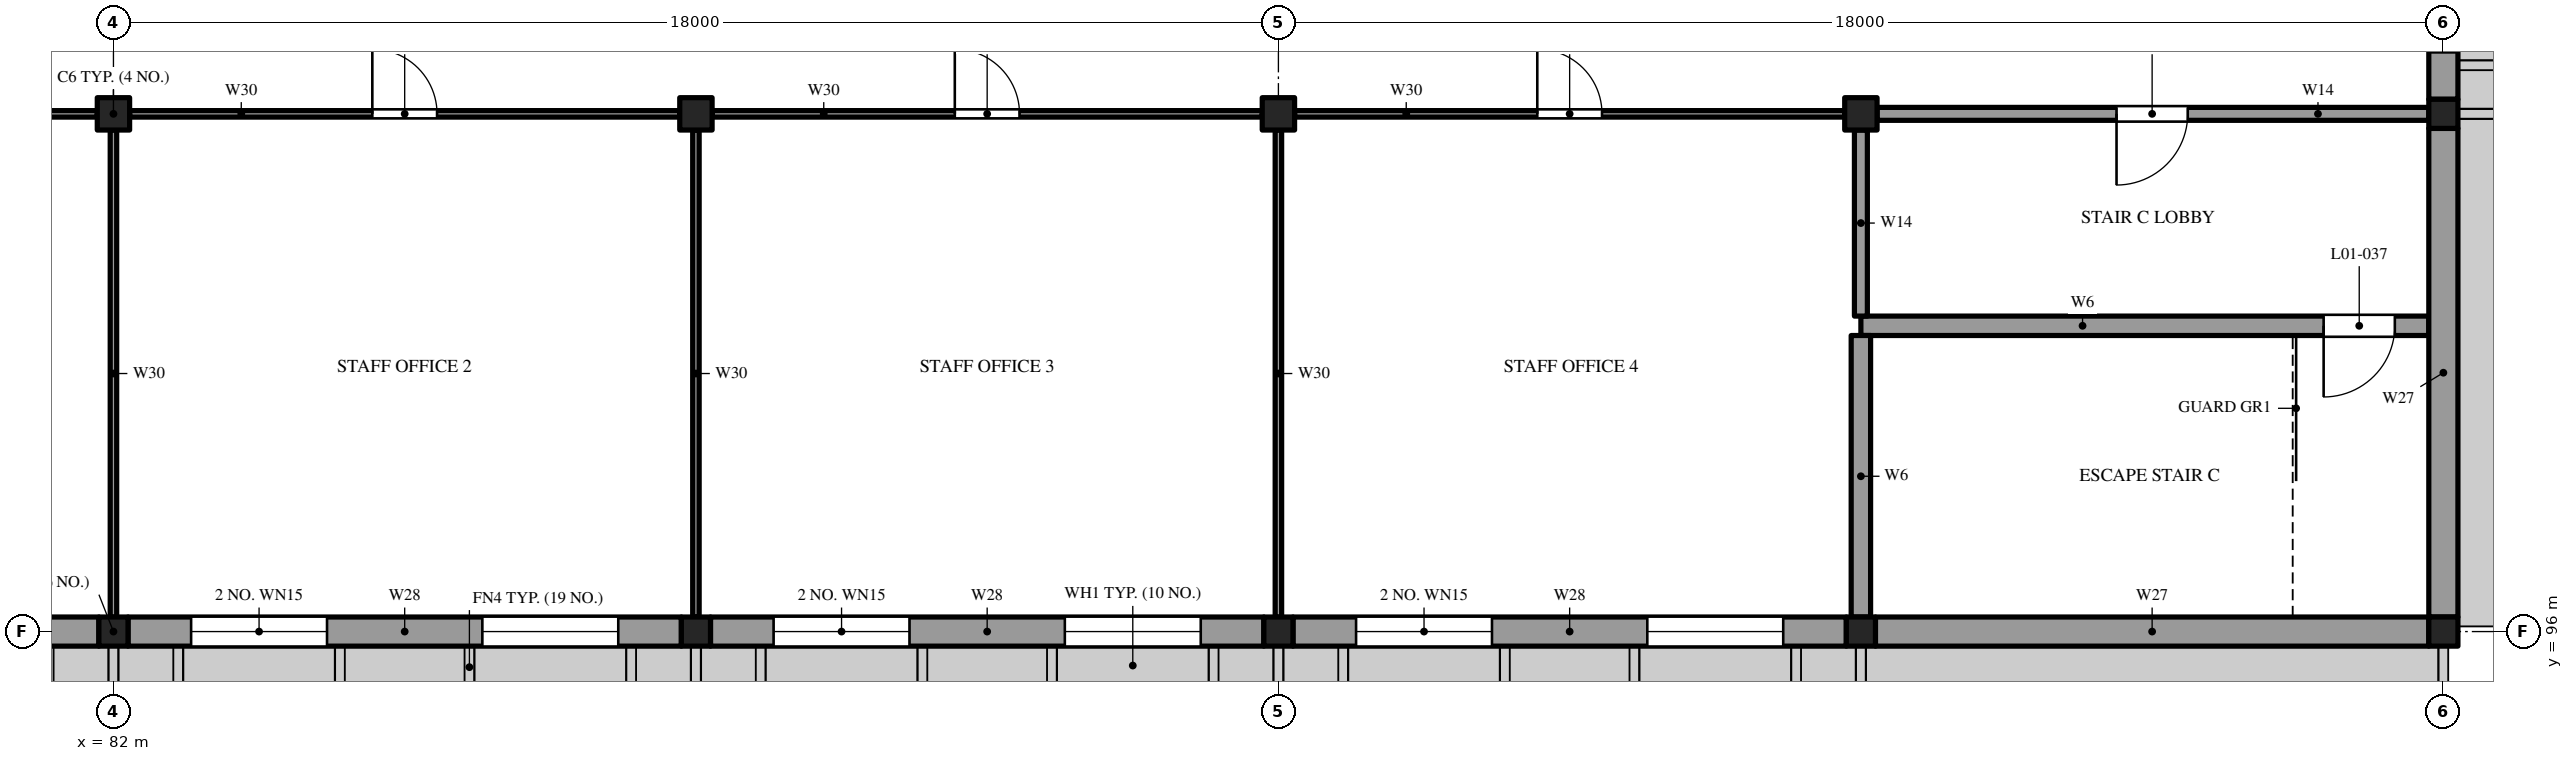
"""IFC4 building model, lengths in metres.
Left out: names, types, materials, properties, quantities, classifications, styles, units other than length and angle.
Written with IfcOpenShell. Run it as: python <this file> out.ifc"""

import sys

from ifc_helpers import new_model, si_unit, direction, frame, frame_2d, origin, origin_2d, place, context, subcontext, project, spatial, rectangle, extrude, element, fill, save


model = new_model("IFC4")
c1 = context("Model", 3, precision=1e-05, world=origin(), true_north=direction((0.0, 1.0)))
c2 = subcontext(c1, "Body", "Model", "MODEL_VIEW")
j1 = project(units=[si_unit("LENGTHUNIT", "METRE"), si_unit("PLANEANGLEUNIT", "RADIAN")], contexts=[c1])
p1 = place(None, origin())
s1 = spatial("IfcSite", under=j1, at=p1, CompositionType="ELEMENT")
p2 = place(p1, origin())
s2 = spatial("IfcBuilding", under=s1, at=p2, CompositionType="ELEMENT")
p3 = place(p2, frame((0.0, 0.0, 7.2)))
s3 = spatial("IfcBuildingStorey", under=s2, at=p3, CompositionType="ELEMENT", Elevation=7.2)
p4 = place(p3, frame((82.0, 96.0, 0.0), z_axis=(0.0, 0.0, 1.0), x_axis=(1.0, 0.0, 0.0)))
e1 = element("IfcColumn", 1, at=p4, inside=s3, PredefinedType="COLUMN", context=c2, shape_type="SweptSolid", body=[
    extrude(rectangle(XDim=0.45, YDim=0.45, at=origin_2d()), origin(), (0.0, 0.0, 1.0), 4.8),
])
p5 = place(p3, frame((82.0, 104.0, 0.0), z_axis=(0.0, 0.0, 1.0), x_axis=(1.0, 0.0, 0.0)))
e2 = element("IfcColumn", 2, at=p5, inside=s3, PredefinedType="COLUMN", context=c2, shape_type="SweptSolid", body=[
    extrude(rectangle(XDim=0.5, YDim=0.5, at=origin_2d()), origin(), (0.0, 0.0, 1.0), 4.8),
])
p6 = place(p3, frame((91.0, 96.0, 0.0), z_axis=(0.0, 0.0, 1.0), x_axis=(1.0, 0.0, 0.0)))
e3 = element("IfcColumn", 3, at=p6, inside=s3, PredefinedType="COLUMN", context=c2, shape_type="SweptSolid", body=[
    extrude(rectangle(XDim=0.45, YDim=0.45, at=origin_2d()), origin(), (0.0, 0.0, 1.0), 4.8),
])
p7 = place(p3, frame((91.0, 104.0, 0.0), z_axis=(0.0, 0.0, 1.0), x_axis=(1.0, 0.0, 0.0)))
e4 = element("IfcColumn", 4, at=p7, inside=s3, PredefinedType="COLUMN", context=c2, shape_type="SweptSolid", body=[
    extrude(rectangle(XDim=0.5, YDim=0.5, at=origin_2d()), origin(), (0.0, 0.0, 1.0), 4.8),
])
p8 = place(p3, frame((100.0, 96.0, 0.0), z_axis=(0.0, 0.0, 1.0), x_axis=(1.0, 0.0, 0.0)))
e5 = element("IfcColumn", 5, at=p8, inside=s3, PredefinedType="COLUMN", context=c2, shape_type="SweptSolid", body=[
    extrude(rectangle(XDim=0.45, YDim=0.45, at=origin_2d()), origin(), (0.0, 0.0, 1.0), 4.8),
])
p9 = place(p3, frame((100.0, 104.0, 0.0), z_axis=(0.0, 0.0, 1.0), x_axis=(1.0, 0.0, 0.0)))
e6 = element("IfcColumn", 6, at=p9, inside=s3, PredefinedType="COLUMN", context=c2, shape_type="SweptSolid", body=[
    extrude(rectangle(XDim=0.5, YDim=0.5, at=origin_2d()), origin(), (0.0, 0.0, 1.0), 4.8),
])
p10 = place(p3, frame((109.0, 96.0, 0.0), z_axis=(0.0, 0.0, 1.0), x_axis=(1.0, 0.0, 0.0)))
e7 = element("IfcColumn", 7, at=p10, inside=s3, PredefinedType="COLUMN", context=c2, shape_type="SweptSolid", body=[
    extrude(rectangle(XDim=0.45, YDim=0.45, at=origin_2d()), origin(), (0.0, 0.0, 1.0), 4.8),
])
p11 = place(p3, frame((109.0, 104.0, 0.0), z_axis=(0.0, 0.0, 1.0), x_axis=(1.0, 0.0, 0.0)))
e8 = element("IfcColumn", 8, at=p11, inside=s3, PredefinedType="COLUMN", context=c2, shape_type="SweptSolid", body=[
    extrude(rectangle(XDim=0.5, YDim=0.5, at=origin_2d()), origin(), (0.0, 0.0, 1.0), 4.8),
])
for number, where, z_axis, x_axis in (
    (9, (118.0, 96.0, 0.0), (0.0, 0.0, 1.0), (1.0, 0.0, 0.0)),
    (10, (118.0, 104.0, 0.0), (0.0, 0.0, 1.0), (1.0, 0.0, 0.0)),
):
    element("IfcColumn", number, at=place(p3, frame(where, z_axis=z_axis, x_axis=x_axis)), inside=s3, PredefinedType="COLUMN", context=c2, shape_type="SweptSolid", body=[
        extrude(rectangle(XDim=0.45, YDim=0.45, at=origin_2d()), origin(), (0.0, 0.0, 1.0), 4.8),
    ])
p12 = place(p3, frame((73.225, 96.0, 0.0), z_axis=(0.0, 0.0, 1.0), x_axis=(1.0, 0.0, 0.0)))
e11 = element("IfcWall", 11, at=p12, inside=s3, PredefinedType="SOLIDWALL", context=c2, shape_type="SweptSolid", body=[
    extrude(rectangle(XDim=8.55, YDim=0.45, at=frame_2d((4.275, 0.0))), origin(), (0.0, 0.0, 1.0), 4.5),
])
p13 = place(p12, frame((0.975, 0.0, 0.9)))
e12 = element("IfcOpeningElement", 12, at=p13, cuts=e11, PredefinedType="OPENING", context=c2, shape_type="SweptSolid", body=[
    extrude(rectangle(XDim=2.1, YDim=2.2, at=frame_2d((1.05, 1.1))), frame((0.0, 0.235, 0.0), z_axis=(0.0, -1.0, 0.0), x_axis=(1.0, 0.0, 0.0)), (0.0, 0.0, 1.0), 0.47),
])
p14 = place(p12, frame((5.475, 0.0, 0.9)))
e13 = element("IfcOpeningElement", 13, at=p14, cuts=e11, PredefinedType="OPENING", context=c2, shape_type="SweptSolid", body=[
    extrude(rectangle(XDim=2.1, YDim=2.2, at=frame_2d((1.05, 1.1))), frame((0.0, 0.235, 0.0), z_axis=(0.0, -1.0, 0.0), x_axis=(1.0, 0.0, 0.0)), (0.0, 0.0, 1.0), 0.47),
])
p15 = place(p3, frame((82.225, 96.0, 0.0), z_axis=(0.0, 0.0, 1.0), x_axis=(1.0, 0.0, 0.0)))
e14 = element("IfcWall", 14, at=p15, inside=s3, PredefinedType="SOLIDWALL", context=c2, shape_type="SweptSolid", body=[
    extrude(rectangle(XDim=8.55, YDim=0.45, at=frame_2d((4.275, 0.0))), origin(), (0.0, 0.0, 1.0), 4.5),
])
p16 = place(p15, frame((0.975, 0.0, 0.9)))
e15 = element("IfcOpeningElement", 15, at=p16, cuts=e14, PredefinedType="OPENING", context=c2, shape_type="SweptSolid", body=[
    extrude(rectangle(XDim=2.1, YDim=2.2, at=frame_2d((1.05, 1.1))), frame((0.0, 0.235, 0.0), z_axis=(0.0, -1.0, 0.0), x_axis=(1.0, 0.0, 0.0)), (0.0, 0.0, 1.0), 0.47),
])
p17 = place(p15, frame((5.475, 0.0, 0.9)))
e16 = element("IfcOpeningElement", 16, at=p17, cuts=e14, PredefinedType="OPENING", context=c2, shape_type="SweptSolid", body=[
    extrude(rectangle(XDim=2.1, YDim=2.2, at=frame_2d((1.05, 1.1))), frame((0.0, 0.235, 0.0), z_axis=(0.0, -1.0, 0.0), x_axis=(1.0, 0.0, 0.0)), (0.0, 0.0, 1.0), 0.47),
])
p18 = place(p3, frame((91.225, 96.0, 0.0), z_axis=(0.0, 0.0, 1.0), x_axis=(1.0, 0.0, 0.0)))
e17 = element("IfcWall", 17, at=p18, inside=s3, PredefinedType="SOLIDWALL", context=c2, shape_type="SweptSolid", body=[
    extrude(rectangle(XDim=8.55, YDim=0.45, at=frame_2d((4.275, 0.0))), origin(), (0.0, 0.0, 1.0), 4.5),
])
p19 = place(p18, frame((0.975, 0.0, 0.9)))
e18 = element("IfcOpeningElement", 18, at=p19, cuts=e17, PredefinedType="OPENING", context=c2, shape_type="SweptSolid", body=[
    extrude(rectangle(XDim=2.1, YDim=2.2, at=frame_2d((1.05, 1.1))), frame((0.0, 0.235, 0.0), z_axis=(0.0, -1.0, 0.0), x_axis=(1.0, 0.0, 0.0)), (0.0, 0.0, 1.0), 0.47),
])
p20 = place(p18, frame((5.475, 0.0, 0.9)))
e19 = element("IfcOpeningElement", 19, at=p20, cuts=e17, PredefinedType="OPENING", context=c2, shape_type="SweptSolid", body=[
    extrude(rectangle(XDim=2.1, YDim=2.2, at=frame_2d((1.05, 1.1))), frame((0.0, 0.235, 0.0), z_axis=(0.0, -1.0, 0.0), x_axis=(1.0, 0.0, 0.0)), (0.0, 0.0, 1.0), 0.47),
])
p21 = place(p3, frame((100.225, 96.0, 0.0), z_axis=(0.0, 0.0, 1.0), x_axis=(1.0, 0.0, 0.0)))
e20 = element("IfcWall", 20, at=p21, inside=s3, PredefinedType="SOLIDWALL", context=c2, shape_type="SweptSolid", body=[
    extrude(rectangle(XDim=8.55, YDim=0.45, at=frame_2d((4.275, 0.0))), origin(), (0.0, 0.0, 1.0), 4.5),
])
p22 = place(p21, frame((0.975, 0.0, 0.9)))
e21 = element("IfcOpeningElement", 21, at=p22, cuts=e20, PredefinedType="OPENING", context=c2, shape_type="SweptSolid", body=[
    extrude(rectangle(XDim=2.1, YDim=2.2, at=frame_2d((1.05, 1.1))), frame((0.0, 0.235, 0.0), z_axis=(0.0, -1.0, 0.0), x_axis=(1.0, 0.0, 0.0)), (0.0, 0.0, 1.0), 0.47),
])
p23 = place(p21, frame((5.475, 0.0, 0.9)))
e22 = element("IfcOpeningElement", 22, at=p23, cuts=e20, PredefinedType="OPENING", context=c2, shape_type="SweptSolid", body=[
    extrude(rectangle(XDim=2.1, YDim=2.2, at=frame_2d((1.05, 1.1))), frame((0.0, 0.235, 0.0), z_axis=(0.0, -1.0, 0.0), x_axis=(1.0, 0.0, 0.0)), (0.0, 0.0, 1.0), 0.47),
])
p24 = place(p3, frame((109.225, 96.0, 0.0), z_axis=(0.0, 0.0, 1.0), x_axis=(1.0, 0.0, 0.0)))
e23 = element("IfcWall", 23, at=p24, inside=s3, PredefinedType="SOLIDWALL", context=c2, shape_type="SweptSolid", body=[
    extrude(rectangle(XDim=8.55, YDim=0.45, at=frame_2d((4.275, 0.0))), origin(), (0.0, 0.0, 1.0), 4.5),
])
p25 = place(p3, frame((109.0, 100.725, 0.0), z_axis=(0.0, 0.0, 1.0), x_axis=(1.0, 0.0, 0.0)))
e24 = element("IfcWall", 24, at=p25, inside=s3, PredefinedType="SHEAR", context=c2, shape_type="SweptSolid", body=[
    extrude(rectangle(XDim=8.775, YDim=0.3, at=frame_2d((4.387, 0.0))), origin(), (0.0, 0.0, 1.0), 4.5),
])
p26 = place(p25, frame((7.15, 0.0, 0.0)))
e25 = element("IfcOpeningElement", 25, at=p26, cuts=e24, PredefinedType="OPENING", context=c2, shape_type="SweptSolid", body=[
    extrude(rectangle(XDim=1.1, YDim=2.1, at=frame_2d((0.55, 1.05))), frame((0.0, 0.16, 0.0), z_axis=(0.0, -1.0, 0.0), x_axis=(1.0, 0.0, 0.0)), (0.0, 0.0, 1.0), 0.32),
])
p27 = place(p3, frame((73.225, 104.0, 0.0), z_axis=(0.0, 0.0, 1.0), x_axis=(1.0, 0.0, 0.0)))
e26 = element("IfcWall", 26, at=p27, inside=s3, PredefinedType="PARTITIONING", context=c2, shape_type="SweptSolid", body=[
    extrude(rectangle(XDim=8.525, YDim=0.1, at=frame_2d((4.262, 0.0))), origin(), (0.0, 0.0, 1.0), 4.5),
])
p28 = place(p27, frame((3.775, 0.0, 0.0)))
e27 = element("IfcOpeningElement", 27, at=p28, cuts=e26, PredefinedType="OPENING", context=c2, shape_type="SweptSolid", body=[
    extrude(rectangle(XDim=1.0, YDim=2.1, at=frame_2d((0.5, 1.05))), frame((0.0, 0.06, 0.0), z_axis=(0.0, -1.0, 0.0), x_axis=(1.0, 0.0, 0.0)), (0.0, 0.0, 1.0), 0.12),
])
p29 = place(p3, frame((82.25, 104.0, 0.0), z_axis=(0.0, 0.0, 1.0), x_axis=(1.0, 0.0, 0.0)))
e28 = element("IfcWall", 28, at=p29, inside=s3, PredefinedType="PARTITIONING", context=c2, shape_type="SweptSolid", body=[
    extrude(rectangle(XDim=8.5, YDim=0.1, at=frame_2d((4.25, 0.0))), origin(), (0.0, 0.0, 1.0), 4.5),
])
p30 = place(p29, frame((3.75, 0.0, 0.0)))
e29 = element("IfcOpeningElement", 29, at=p30, cuts=e28, PredefinedType="OPENING", context=c2, shape_type="SweptSolid", body=[
    extrude(rectangle(XDim=1.0, YDim=2.1, at=frame_2d((0.5, 1.05))), frame((0.0, 0.06, 0.0), z_axis=(0.0, -1.0, 0.0), x_axis=(1.0, 0.0, 0.0)), (0.0, 0.0, 1.0), 0.12),
])
p31 = place(p3, frame((91.25, 104.0, 0.0), z_axis=(0.0, 0.0, 1.0), x_axis=(1.0, 0.0, 0.0)))
e30 = element("IfcWall", 30, at=p31, inside=s3, PredefinedType="PARTITIONING", context=c2, shape_type="SweptSolid", body=[
    extrude(rectangle(XDim=8.5, YDim=0.1, at=frame_2d((4.25, 0.0))), origin(), (0.0, 0.0, 1.0), 4.5),
])
p32 = place(p31, frame((3.75, 0.0, 0.0)))
e31 = element("IfcOpeningElement", 31, at=p32, cuts=e30, PredefinedType="OPENING", context=c2, shape_type="SweptSolid", body=[
    extrude(rectangle(XDim=1.0, YDim=2.1, at=frame_2d((0.5, 1.05))), frame((0.0, 0.06, 0.0), z_axis=(0.0, -1.0, 0.0), x_axis=(1.0, 0.0, 0.0)), (0.0, 0.0, 1.0), 0.12),
])
p33 = place(p3, frame((100.25, 104.0, 0.0), z_axis=(0.0, 0.0, 1.0), x_axis=(1.0, 0.0, 0.0)))
e32 = element("IfcWall", 32, at=p33, inside=s3, PredefinedType="PARTITIONING", context=c2, shape_type="SweptSolid", body=[
    extrude(rectangle(XDim=8.5, YDim=0.1, at=frame_2d((4.25, 0.0))), origin(), (0.0, 0.0, 1.0), 4.5),
])
p34 = place(p33, frame((3.75, 0.0, 0.0)))
e33 = element("IfcOpeningElement", 33, at=p34, cuts=e32, PredefinedType="OPENING", context=c2, shape_type="SweptSolid", body=[
    extrude(rectangle(XDim=1.0, YDim=2.1, at=frame_2d((0.5, 1.05))), frame((0.0, 0.06, 0.0), z_axis=(0.0, -1.0, 0.0), x_axis=(1.0, 0.0, 0.0)), (0.0, 0.0, 1.0), 0.12),
])
p35 = place(p3, frame((109.25, 104.0, 0.0), z_axis=(0.0, 0.0, 1.0), x_axis=(1.0, 0.0, 0.0)))
e34 = element("IfcWall", 34, at=p35, inside=s3, PredefinedType="SOLIDWALL", context=c2, shape_type="SweptSolid", body=[
    extrude(rectangle(XDim=8.525, YDim=0.2, at=frame_2d((4.262, 0.0))), origin(), (0.0, 0.0, 1.0), 4.5),
])
p36 = place(p35, frame((3.7, 0.0, 0.0)))
e35 = element("IfcOpeningElement", 35, at=p36, cuts=e34, PredefinedType="OPENING", context=c2, shape_type="SweptSolid", body=[
    extrude(rectangle(XDim=1.1, YDim=2.1, at=frame_2d((0.55, 1.05))), frame((0.0, 0.11, 0.0), z_axis=(0.0, -1.0, 0.0), x_axis=(1.0, 0.0, 0.0)), (0.0, 0.0, 1.0), 0.22),
])
for number, where, z_axis, x_axis in (
    (36, (82.0, 96.225, 0.0), (0.0, 0.0, 1.0), (0.0, 1.0, 0.0)),
    (37, (91.0, 96.225, 0.0), (0.0, 0.0, 1.0), (0.0, 1.0, 0.0)),
    (38, (100.0, 96.225, 0.0), (0.0, 0.0, 1.0), (0.0, 1.0, 0.0)),
):
    element("IfcWall", number, at=place(p3, frame(where, z_axis=z_axis, x_axis=x_axis)), inside=s3, PredefinedType="PARTITIONING", context=c2, shape_type="SweptSolid", body=[
        extrude(rectangle(XDim=7.525, YDim=0.1, at=frame_2d((3.762, 0.0))), origin(), (0.0, 0.0, 1.0), 4.5),
    ])
p37 = place(p3, frame((109.0, 96.225, 0.0), z_axis=(0.0, 0.0, 1.0), x_axis=(0.0, 1.0, 0.0)))
e39 = element("IfcWall", 39, at=p37, inside=s3, PredefinedType="SHEAR", context=c2, shape_type="SweptSolid", body=[
    extrude(rectangle(XDim=4.35, YDim=0.3, at=frame_2d((2.175, 0.0))), origin(), (0.0, 0.0, 1.0), 4.5),
])
p38 = place(p3, frame((109.0, 100.875, 0.0), z_axis=(0.0, 0.0, 1.0), x_axis=(0.0, 1.0, 0.0)))
e40 = element("IfcWall", 40, at=p38, inside=s3, PredefinedType="SOLIDWALL", context=c2, shape_type="SweptSolid", body=[
    extrude(rectangle(XDim=2.875, YDim=0.2, at=frame_2d((1.438, 0.0))), origin(), (0.0, 0.0, 1.0), 4.5),
])
p39 = place(p3, frame((118.0, 96.225, 0.0), z_axis=(0.0, 0.0, 1.0), x_axis=(0.0, 1.0, 0.0)))
e41 = element("IfcWall", 41, at=p39, inside=s3, PredefinedType="SOLIDWALL", context=c2, shape_type="SweptSolid", body=[
    extrude(rectangle(XDim=7.55, YDim=0.45, at=frame_2d((3.775, 0.0))), origin(), (0.0, 0.0, 1.0), 4.5),
])
p40 = place(p3, frame((118.0, 104.225, 0.0), z_axis=(0.0, 0.0, 1.0), x_axis=(0.0, 1.0, 0.0)))
e42 = element("IfcWall", 42, at=p40, inside=s3, PredefinedType="SOLIDWALL", context=c2, shape_type="SweptSolid", body=[
    extrude(rectangle(XDim=7.55, YDim=0.45, at=frame_2d((3.775, 0.0))), origin(), (0.0, 0.0, 1.0), 4.5),
])
p41 = place(p40, frame((0.725, 0.0, 0.9)))
e43 = element("IfcOpeningElement", 43, at=p41, cuts=e42, PredefinedType="OPENING", context=c2, shape_type="SweptSolid", body=[
    extrude(rectangle(XDim=2.1, YDim=2.2, at=frame_2d((1.05, 1.1))), frame((0.0, 0.235, 0.0), z_axis=(0.0, -1.0, 0.0), x_axis=(1.0, 0.0, 0.0)), (0.0, 0.0, 1.0), 0.47),
])
p42 = place(p40, frame((4.725, 0.0, 0.9)))
e44 = element("IfcOpeningElement", 44, at=p42, cuts=e42, PredefinedType="OPENING", context=c2, shape_type="SweptSolid", body=[
    extrude(rectangle(XDim=2.1, YDim=2.2, at=frame_2d((1.05, 1.1))), frame((0.0, 0.235, 0.0), z_axis=(0.0, -1.0, 0.0), x_axis=(1.0, 0.0, 0.0)), (0.0, 0.0, 1.0), 0.47),
])
p43 = place(p36, frame((1.1, 0.0, 0.0), z_axis=(0.0, 0.0, 1.0), x_axis=(-1.0, 0.0, 0.0)))
e45 = element("IfcDoor", 45, at=p43, inside=s3, OperationType="SINGLE_SWING_RIGHT", PredefinedType="DOOR", context=c2, shape_type="SweptSolid", body=[
    extrude(rectangle(XDim=1.1, YDim=2.1, at=frame_2d((0.55, 1.05))), frame((0.0, 0.025, 0.0), z_axis=(0.0, -1.0, 0.0), x_axis=(1.0, 0.0, 0.0)), (0.0, 0.0, 1.0), 0.05),
])
fill(e35, e45)
p44 = place(p26, frame((1.1, 0.0, 0.0), z_axis=(0.0, 0.0, 1.0), x_axis=(-1.0, 0.0, 0.0)))
e46 = element("IfcDoor", 46, at=p44, inside=s3, OperationType="SINGLE_SWING_LEFT", PredefinedType="DOOR", context=c2, shape_type="SweptSolid", body=[
    extrude(rectangle(XDim=1.1, YDim=2.1, at=frame_2d((0.55, 1.05))), frame((0.0, 0.025, 0.0), z_axis=(0.0, -1.0, 0.0), x_axis=(1.0, 0.0, 0.0)), (0.0, 0.0, 1.0), 0.05),
])
fill(e25, e46)
p45 = place(p30, origin())
e47 = element("IfcDoor", 47, at=p45, inside=s3, OperationType="SINGLE_SWING_LEFT", PredefinedType="DOOR", context=c2, shape_type="SweptSolid", body=[
    extrude(rectangle(XDim=1.0, YDim=2.1, at=frame_2d((0.5, 1.05))), frame((0.0, 0.025, 0.0), z_axis=(0.0, -1.0, 0.0), x_axis=(1.0, 0.0, 0.0)), (0.0, 0.0, 1.0), 0.05),
])
fill(e29, e47)
p46 = place(p32, origin())
e48 = element("IfcDoor", 48, at=p46, inside=s3, OperationType="SINGLE_SWING_RIGHT", PredefinedType="DOOR", context=c2, shape_type="SweptSolid", body=[
    extrude(rectangle(XDim=1.0, YDim=2.1, at=frame_2d((0.5, 1.05))), frame((0.0, 0.025, 0.0), z_axis=(0.0, -1.0, 0.0), x_axis=(1.0, 0.0, 0.0)), (0.0, 0.0, 1.0), 0.05),
])
fill(e31, e48)
p47 = place(p34, origin())
e49 = element("IfcDoor", 49, at=p47, inside=s3, OperationType="SINGLE_SWING_LEFT", PredefinedType="DOOR", context=c2, shape_type="SweptSolid", body=[
    extrude(rectangle(XDim=1.0, YDim=2.1, at=frame_2d((0.5, 1.05))), frame((0.0, 0.025, 0.0), z_axis=(0.0, -1.0, 0.0), x_axis=(1.0, 0.0, 0.0)), (0.0, 0.0, 1.0), 0.05),
])
fill(e33, e49)
p48 = place(p16, origin())
e50 = element("IfcWindow", 50, at=p48, inside=s3, PartitioningType="SINGLE_PANEL", PredefinedType="WINDOW", context=c2, shape_type="SweptSolid", body=[
    extrude(rectangle(XDim=2.1, YDim=2.2, at=frame_2d((1.05, 1.1))), frame((0.0, 0.215, 0.0), z_axis=(0.0, -1.0, 0.0), x_axis=(1.0, 0.0, 0.0)), (0.0, 0.0, 1.0), 0.06),
])
fill(e15, e50)
p49 = place(p17, origin())
e51 = element("IfcWindow", 51, at=p49, inside=s3, PartitioningType="SINGLE_PANEL", PredefinedType="WINDOW", context=c2, shape_type="SweptSolid", body=[
    extrude(rectangle(XDim=2.1, YDim=2.2, at=frame_2d((1.05, 1.1))), frame((0.0, 0.215, 0.0), z_axis=(0.0, -1.0, 0.0), x_axis=(1.0, 0.0, 0.0)), (0.0, 0.0, 1.0), 0.06),
])
fill(e16, e51)
p50 = place(p19, origin())
e52 = element("IfcWindow", 52, at=p50, inside=s3, PartitioningType="SINGLE_PANEL", PredefinedType="WINDOW", context=c2, shape_type="SweptSolid", body=[
    extrude(rectangle(XDim=2.1, YDim=2.2, at=frame_2d((1.05, 1.1))), frame((0.0, 0.215, 0.0), z_axis=(0.0, -1.0, 0.0), x_axis=(1.0, 0.0, 0.0)), (0.0, 0.0, 1.0), 0.06),
])
fill(e18, e52)
p51 = place(p20, origin())
e53 = element("IfcWindow", 53, at=p51, inside=s3, PartitioningType="SINGLE_PANEL", PredefinedType="WINDOW", context=c2, shape_type="SweptSolid", body=[
    extrude(rectangle(XDim=2.1, YDim=2.2, at=frame_2d((1.05, 1.1))), frame((0.0, 0.215, 0.0), z_axis=(0.0, -1.0, 0.0), x_axis=(1.0, 0.0, 0.0)), (0.0, 0.0, 1.0), 0.06),
])
fill(e19, e53)
p52 = place(p22, origin())
e54 = element("IfcWindow", 54, at=p52, inside=s3, PartitioningType="SINGLE_PANEL", PredefinedType="WINDOW", context=c2, shape_type="SweptSolid", body=[
    extrude(rectangle(XDim=2.1, YDim=2.2, at=frame_2d((1.05, 1.1))), frame((0.0, 0.215, 0.0), z_axis=(0.0, -1.0, 0.0), x_axis=(1.0, 0.0, 0.0)), (0.0, 0.0, 1.0), 0.06),
])
fill(e21, e54)
p53 = place(p23, origin())
e55 = element("IfcWindow", 55, at=p53, inside=s3, PartitioningType="SINGLE_PANEL", PredefinedType="WINDOW", context=c2, shape_type="SweptSolid", body=[
    extrude(rectangle(XDim=2.1, YDim=2.2, at=frame_2d((1.05, 1.1))), frame((0.0, 0.215, 0.0), z_axis=(0.0, -1.0, 0.0), x_axis=(1.0, 0.0, 0.0)), (0.0, 0.0, 1.0), 0.06),
])
fill(e22, e55)
save(model, sys.argv[1])
